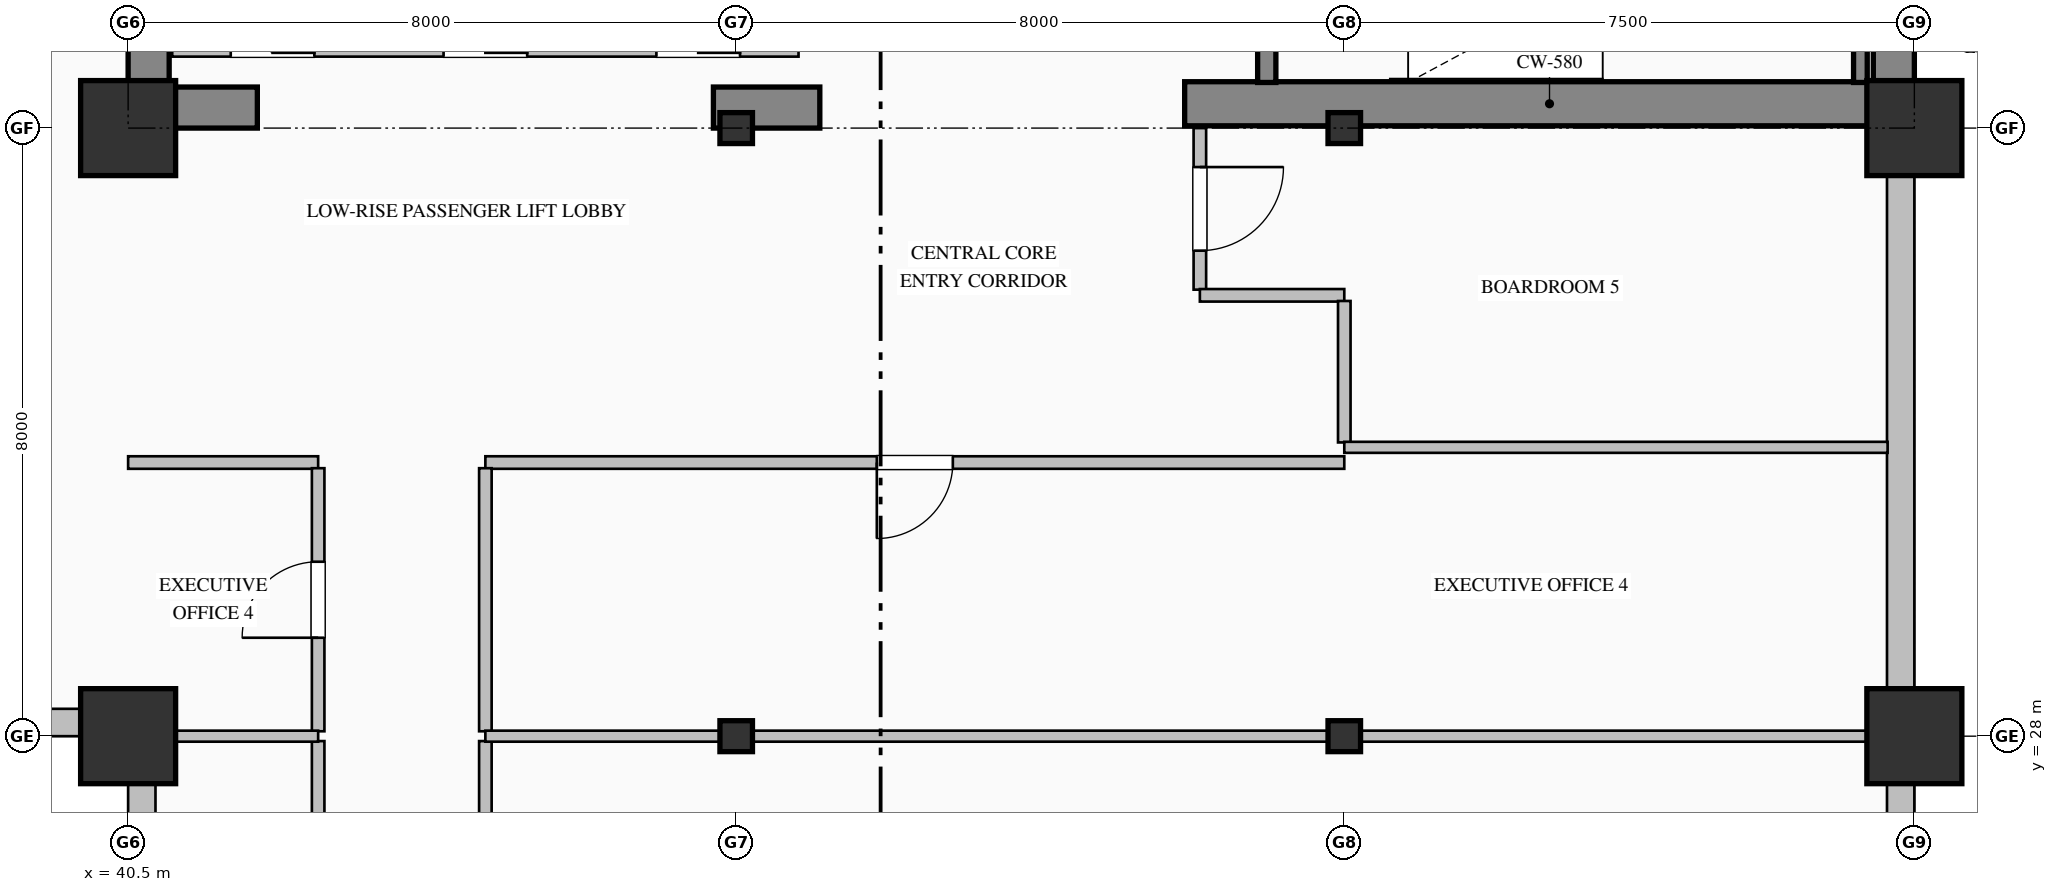
"""IFC4 building model, lengths in metres.
Left out: names, types, materials, properties, quantities, classifications, styles, units other than length and angle.
Written with IfcOpenShell. Run it as: python <this file> out.ifc"""

import sys

from ifc_helpers import new_model, si_unit, direction, frame, frame_2d, origin, origin_2d, place, context, subcontext, project, spatial, rectangle, hollow_rectangle, i_section, extrude, element, fill, save


model = new_model("IFC4")
c1 = context("Model", 3, precision=1e-05, world=origin(), true_north=direction((0.0, 1.0)))
c2 = subcontext(c1, "Body", "Model", "MODEL_VIEW")
j1 = project(units=[si_unit("LENGTHUNIT", "METRE"), si_unit("PLANEANGLEUNIT", "RADIAN")], contexts=[c1])
p1 = place(None, origin())
s1 = spatial("IfcSite", under=j1, at=p1, CompositionType="ELEMENT")
p2 = place(p1, origin())
s2 = spatial("IfcBuilding", under=s1, at=p2, CompositionType="ELEMENT")
p3 = place(p2, frame((0.0, 0.0, 36.2)))
s3 = spatial("IfcBuildingStorey", under=s2, at=p3, CompositionType="ELEMENT", Elevation=36.2)
p4 = place(p3, frame((63.73, 36.32, 0.0), z_axis=(0.0, 0.0, 1.0), x_axis=(0.0, 1.0, 0.0)))
e1 = element("IfcWall", 1, at=p4, inside=s3, PredefinedType="SHEAR", context=c2, shape_type="SweptSolid", body=[
    extrude(rectangle(XDim=15.14, YDim=0.54, at=frame_2d((7.57, 0.0))), origin(), (0.0, 0.0, 1.0), 3.75),
])
p5 = place(p3, frame((40.77, 36.54, 0.0), z_axis=(0.0, 0.0, 1.0), x_axis=(0.0, 1.0, 0.0)))
e2 = element("IfcWall", 2, at=p5, inside=s3, PredefinedType="SHEAR", context=c2, shape_type="SweptSolid", body=[
    extrude(rectangle(XDim=7.86, YDim=0.54, at=frame_2d((3.93, 0.0))), origin(), (0.0, 0.0, 1.0), 3.75),
])
p6 = place(p3, frame((40.5, 36.27, 0.0), z_axis=(0.0, 0.0, 1.0), x_axis=(1.0, 0.0, 0.0)))
e3 = element("IfcWall", 3, at=p6, inside=s3, PredefinedType="SHEAR", context=c2, shape_type="SweptSolid", body=[
    extrude(rectangle(XDim=1.7, YDim=0.54, at=frame_2d((0.85, 0.0))), origin(), (0.0, 0.0, 1.0), 3.75),
])
p7 = place(p3, frame((48.2, 36.27, 0.0), z_axis=(0.0, 0.0, 1.0), x_axis=(1.0, 0.0, 0.0)))
e4 = element("IfcWall", 4, at=p7, inside=s3, PredefinedType="SHEAR", context=c2, shape_type="SweptSolid", body=[
    extrude(rectangle(XDim=1.4, YDim=0.54, at=frame_2d((0.7, 0.0))), origin(), (0.0, 0.0, 1.0), 3.75),
])
p8 = place(p3, frame((54.4, 36.32, 0.0), z_axis=(0.0, 0.0, 1.0), x_axis=(1.0, 0.0, 0.0)))
e5 = element("IfcWall", 5, at=p8, inside=s3, PredefinedType="SHEAR", context=c2, shape_type="SweptSolid", body=[
    extrude(rectangle(XDim=9.6, YDim=0.58, at=frame_2d((4.8, 0.0))), origin(), (0.0, 0.0, 1.0), 4.0),
])
for number, where, z_axis, x_axis in (
    (6, (40.5, 28.0, 0.0), (0.0, 0.0, 1.0), (1.0, 0.0, 0.0)),
    (7, (40.5, 36.0, 0.0), (0.0, 0.0, 1.0), (1.0, 0.0, 0.0)),
):
    element("IfcColumn", number, at=place(p3, frame(where, z_axis=z_axis, x_axis=x_axis)), inside=s3, PredefinedType="COLUMN", context=c2, shape_type="SweptSolid", body=[
        extrude(hollow_rectangle(XDim=1.25, YDim=1.25, WallThickness=0.045, at=origin_2d()), origin(), (0.0, 0.0, 1.0), 4.0),
    ])
for number, where, z_axis, x_axis in (
    (8, (48.5, 28.0, 0.0), (0.0, 0.0, 1.0), (1.0, 0.0, 0.0)),
    (9, (48.5, 36.0, 0.0), (0.0, 0.0, 1.0), (1.0, 0.0, 0.0)),
    (10, (56.5, 28.0, 0.0), (0.0, 0.0, 1.0), (1.0, 0.0, 0.0)),
    (11, (56.5, 36.0, 0.0), (0.0, 0.0, 1.0), (1.0, 0.0, 0.0)),
):
    element("IfcColumn", number, at=place(p3, frame(where, z_axis=z_axis, x_axis=x_axis)), inside=s3, PredefinedType="COLUMN", context=c2, shape_type="SweptSolid", body=[
        extrude(i_section(OverallWidth=0.407, OverallDepth=0.428, WebThickness=0.02, FlangeThickness=0.035, FilletRadius=0.022, at=origin_2d()), origin(), (0.0, 0.0, 1.0), 4.0),
    ])
for number, where, z_axis, x_axis in (
    (12, (64.0, 28.0, 0.0), (0.0, 0.0, 1.0), (1.0, 0.0, 0.0)),
    (13, (64.0, 36.0, 0.0), (0.0, 0.0, 1.0), (1.0, 0.0, 0.0)),
):
    element("IfcColumn", number, at=place(p3, frame(where, z_axis=z_axis, x_axis=x_axis)), inside=s3, PredefinedType="COLUMN", context=c2, shape_type="SweptSolid", body=[
        extrude(hollow_rectangle(XDim=1.25, YDim=1.25, WallThickness=0.045, at=origin_2d()), origin(), (0.0, 0.0, 1.0), 4.0),
    ])
p9 = place(p3, frame((40.68, 8.0, 0.0), z_axis=(0.0, 0.0, 1.0), x_axis=(0.0, 1.0, 0.0)))
e14 = element("IfcWall", 14, at=p9, inside=s3, PredefinedType="SOLIDWALL", context=c2, shape_type="SweptSolid", body=[
    extrude(rectangle(XDim=20.36, YDim=0.36, at=frame_2d((10.18, 0.0))), origin(), (0.0, 0.0, 1.0), 3.05),
])
p10 = place(p9, frame((6.6, 0.0, 0.7)))
e15 = element("IfcOpeningElement", 15, at=p10, cuts=e14, PredefinedType="OPENING", context=c2, shape_type="SweptSolid", body=[
    extrude(rectangle(XDim=1.2, YDim=1.85, at=frame_2d((0.6, 0.925))), frame((0.0, 0.19, 0.0), z_axis=(0.0, -1.0, 0.0), x_axis=(1.0, 0.0, 0.0)), (0.0, 0.0, 1.0), 0.38),
])
p11 = place(p9, frame((13.8, 0.0, 0.7)))
e16 = element("IfcOpeningElement", 16, at=p11, cuts=e14, PredefinedType="OPENING", context=c2, shape_type="SweptSolid", body=[
    extrude(rectangle(XDim=1.2, YDim=1.85, at=frame_2d((0.6, 0.925))), frame((0.0, 0.19, 0.0), z_axis=(0.0, -1.0, 0.0), x_axis=(1.0, 0.0, 0.0)), (0.0, 0.0, 1.0), 0.38),
])
p12 = place(p3, frame((40.52, 28.18, 0.0), z_axis=(0.0, 0.0, 1.0), x_axis=(-1.0, 0.0, 0.0)))
e17 = element("IfcWall", 17, at=p12, inside=s3, PredefinedType="SOLIDWALL", context=c2, shape_type="SweptSolid", body=[
    extrude(rectangle(XDim=36.52, YDim=0.36, at=frame_2d((18.26, 0.0))), origin(), (0.0, 0.0, 1.0), 3.05),
])
p13 = place(p12, frame((10.2, 0.0, 0.7)))
e18 = element("IfcOpeningElement", 18, at=p13, cuts=e17, PredefinedType="OPENING", context=c2, shape_type="SweptSolid", body=[
    extrude(rectangle(XDim=1.2, YDim=1.85, at=frame_2d((0.6, 0.925))), frame((0.0, 0.19, 0.0), z_axis=(0.0, -1.0, 0.0), x_axis=(1.0, 0.0, 0.0)), (0.0, 0.0, 1.0), 0.38),
])
p14 = place(p12, frame((13.8, 0.0, 0.7)))
e19 = element("IfcOpeningElement", 19, at=p14, cuts=e17, PredefinedType="OPENING", context=c2, shape_type="SweptSolid", body=[
    extrude(rectangle(XDim=1.2, YDim=1.85, at=frame_2d((0.6, 0.925))), frame((0.0, 0.19, 0.0), z_axis=(0.0, -1.0, 0.0), x_axis=(1.0, 0.0, 0.0)), (0.0, 0.0, 1.0), 0.38),
])
p15 = place(p12, frame((17.4, 0.0, 0.7)))
e20 = element("IfcOpeningElement", 20, at=p15, cuts=e17, PredefinedType="OPENING", context=c2, shape_type="SweptSolid", body=[
    extrude(rectangle(XDim=1.2, YDim=1.85, at=frame_2d((0.6, 0.925))), frame((0.0, 0.19, 0.0), z_axis=(0.0, -1.0, 0.0), x_axis=(1.0, 0.0, 0.0)), (0.0, 0.0, 1.0), 0.38),
])
p16 = place(p12, frame((21.0, 0.0, 0.7)))
e21 = element("IfcOpeningElement", 21, at=p16, cuts=e17, PredefinedType="OPENING", context=c2, shape_type="SweptSolid", body=[
    extrude(rectangle(XDim=1.2, YDim=1.85, at=frame_2d((0.6, 0.925))), frame((0.0, 0.19, 0.0), z_axis=(0.0, -1.0, 0.0), x_axis=(1.0, 0.0, 0.0)), (0.0, 0.0, 1.0), 0.38),
])
p17 = place(p12, frame((28.2, 0.0, 0.7)))
e22 = element("IfcOpeningElement", 22, at=p17, cuts=e17, PredefinedType="OPENING", context=c2, shape_type="SweptSolid", body=[
    extrude(rectangle(XDim=1.2, YDim=1.85, at=frame_2d((0.6, 0.925))), frame((0.0, 0.19, 0.0), z_axis=(0.0, -1.0, 0.0), x_axis=(1.0, 0.0, 0.0)), (0.0, 0.0, 1.0), 0.38),
])
p18 = place(p3, frame((63.82, 36.05, 0.0), z_axis=(0.0, 0.0, 1.0), x_axis=(0.0, -1.0, 0.0)))
e23 = element("IfcWall", 23, at=p18, inside=s3, PredefinedType="SOLIDWALL", context=c2, shape_type="SweptSolid", body=[
    extrude(rectangle(XDim=28.05, YDim=0.36, at=frame_2d((14.025, 0.0))), origin(), (0.0, 0.0, 1.0), 3.25),
])
p19 = place(p18, frame((9.75, 0.0, 0.85)))
e24 = element("IfcOpeningElement", 24, at=p19, cuts=e23, PredefinedType="OPENING", context=c2, shape_type="SweptSolid", body=[
    extrude(rectangle(XDim=2.1, YDim=2.05, at=frame_2d((1.05, 1.025))), frame((0.0, 0.19, 0.0), z_axis=(0.0, -1.0, 0.0), x_axis=(1.0, 0.0, 0.0)), (0.0, 0.0, 1.0), 0.38),
])
p20 = place(p18, frame((13.2, 0.0, 0.8)))
e25 = element("IfcOpeningElement", 25, at=p20, cuts=e23, PredefinedType="OPENING", context=c2, shape_type="SweptSolid", body=[
    extrude(rectangle(XDim=2.4, YDim=2.15, at=frame_2d((1.2, 1.075))), frame((0.0, 0.19, 0.0), z_axis=(0.0, -1.0, 0.0), x_axis=(1.0, 0.0, 0.0)), (0.0, 0.0, 1.0), 0.38),
])
p21 = place(p3, frame((55.48, 39.75, 0.0), z_axis=(0.0, 0.0, 1.0), x_axis=(0.0, -1.0, 0.0)))
e26 = element("IfcWall", 26, at=p21, inside=s3, PredefinedType="SOLIDWALL", context=c2, shape_type="SweptSolid", body=[
    extrude(rectangle(XDim=3.15, YDim=0.24, at=frame_2d((1.575, 0.0))), origin(), (0.0, 0.0, 1.0), 4.0),
])
p22 = place(p21, frame((1.0, 0.0, 0.0)))
e27 = element("IfcOpeningElement", 27, at=p22, cuts=e26, PredefinedType="OPENING", context=c2, shape_type="SweptSolid", body=[
    extrude(rectangle(XDim=1.15, YDim=2.2, at=frame_2d((0.575, 1.1))), frame((0.0, 0.13, 0.0), z_axis=(0.0, -1.0, 0.0), x_axis=(1.0, 0.0, 0.0)), (0.0, 0.0, 1.0), 0.26),
])
p23 = place(p3, frame((63.29, 36.6, 0.0), z_axis=(0.0, 0.0, 1.0), x_axis=(0.0, 1.0, 0.0)))
e28 = element("IfcWall", 28, at=p23, inside=s3, PredefinedType="SOLIDWALL", context=c2, shape_type="SweptSolid", body=[
    extrude(rectangle(XDim=3.15, YDim=0.18, at=frame_2d((1.575, 0.0))), origin(), (0.0, 0.0, 1.0), 4.0),
])
p24 = place(p3, frame((49.32, 37.05, 0.0), z_axis=(0.0, 0.0, 1.0), x_axis=(-1.0, 0.0, 0.0)))
e29 = element("IfcWall", 29, at=p24, inside=s3, PredefinedType="PARTITIONING", context=c2, shape_type="SweptSolid", body=[
    extrude(rectangle(XDim=8.24, YDim=0.22, at=frame_2d((4.12, 0.0))), origin(), (0.0, 0.0, 1.0), 3.75),
])
p25 = place(p24, frame((6.37, 0.0, 0.0)))
e30 = element("IfcOpeningElement", 30, at=p25, cuts=e29, PredefinedType="OPENING", context=c2, shape_type="SweptSolid", body=[
    extrude(rectangle(XDim=1.1, YDim=2.2, at=frame_2d((0.55, 1.1))), frame((0.0, 0.12, 0.0), z_axis=(0.0, -1.0, 0.0), x_axis=(1.0, 0.0, 0.0)), (0.0, 0.0, 1.0), 0.24),
])
p26 = place(p24, frame((3.57, 0.0, 0.0)))
e31 = element("IfcOpeningElement", 31, at=p26, cuts=e29, PredefinedType="OPENING", context=c2, shape_type="SweptSolid", body=[
    extrude(rectangle(XDim=1.1, YDim=2.2, at=frame_2d((0.55, 1.1))), frame((0.0, 0.12, 0.0), z_axis=(0.0, -1.0, 0.0), x_axis=(1.0, 0.0, 0.0)), (0.0, 0.0, 1.0), 0.24),
])
p27 = place(p24, frame((0.77, 0.0, 0.0)))
e32 = element("IfcOpeningElement", 32, at=p27, cuts=e29, PredefinedType="OPENING", context=c2, shape_type="SweptSolid", body=[
    extrude(rectangle(XDim=1.1, YDim=2.2, at=frame_2d((0.55, 1.1))), frame((0.0, 0.12, 0.0), z_axis=(0.0, -1.0, 0.0), x_axis=(1.0, 0.0, 0.0)), (0.0, 0.0, 1.0), 0.24),
])
p28 = place(p3, frame((56.5, 31.6, 0.0), z_axis=(0.0, 0.0, 1.0), x_axis=(-1.0, 0.0, 0.0)))
e33 = element("IfcWall", 33, at=p28, inside=s3, PredefinedType="PARTITIONING", context=c2, shape_type="SweptSolid", body=[
    extrude(rectangle(XDim=11.3, YDim=0.165, at=frame_2d((5.65, 0.0))), origin(), (0.0, 0.0, 1.0), 3.75),
])
p29 = place(p28, frame((5.15, 0.0, 0.0)))
e34 = element("IfcOpeningElement", 34, at=p29, cuts=e33, PredefinedType="OPENING", context=c2, shape_type="SweptSolid", body=[
    extrude(rectangle(XDim=1.0, YDim=2.15, at=frame_2d((0.5, 1.075))), frame((0.0, 0.093, 0.0), z_axis=(0.0, -1.0, 0.0), x_axis=(1.0, 0.0, 0.0)), (0.0, 0.0, 1.0), 0.185),
])
p30 = place(p3, frame((54.6, 36.0, 0.0), z_axis=(0.0, 0.0, 1.0), x_axis=(0.0, -1.0, 0.0)))
e35 = element("IfcWall", 35, at=p30, inside=s3, PredefinedType="PARTITIONING", context=c2, shape_type="SweptSolid", body=[
    extrude(rectangle(XDim=2.125, YDim=0.165, at=frame_2d((1.063, 0.0))), origin(), (0.0, 0.0, 1.0), 3.75),
])
p31 = place(p30, frame((0.513, 0.0, 0.0)))
e36 = element("IfcOpeningElement", 36, at=p31, cuts=e35, PredefinedType="OPENING", context=c2, shape_type="SweptSolid", body=[
    extrude(rectangle(XDim=1.1, YDim=2.2, at=frame_2d((0.55, 1.1))), frame((0.0, 0.093, 0.0), z_axis=(0.0, -1.0, 0.0), x_axis=(1.0, 0.0, 0.0)), (0.0, 0.0, 1.0), 0.185),
])
p32 = place(p3, frame((54.6, 33.8, 0.0), z_axis=(0.0, 0.0, 1.0), x_axis=(1.0, 0.0, 0.0)))
e37 = element("IfcWall", 37, at=p32, inside=s3, PredefinedType="PARTITIONING", context=c2, shape_type="SweptSolid", body=[
    extrude(rectangle(XDim=1.9, YDim=0.165, at=frame_2d((0.95, 0.0))), origin(), (0.0, 0.0, 1.0), 3.75),
])
p33 = place(p3, frame((56.5, 33.726, 0.0), z_axis=(0.0, 0.0, 1.0), x_axis=(0.0, -1.0, 0.0)))
e38 = element("IfcWall", 38, at=p33, inside=s3, PredefinedType="PARTITIONING", context=c2, shape_type="SweptSolid", body=[
    extrude(rectangle(XDim=1.861, YDim=0.165, at=frame_2d((0.931, 0.0))), origin(), (0.0, 0.0, 1.0), 3.042),
])
p34 = place(p3, frame((43.0, 31.6, 0.0), z_axis=(0.0, 0.0, 1.0), x_axis=(-1.0, 0.0, 0.0)))
e39 = element("IfcWall", 39, at=p34, inside=s3, PredefinedType="PARTITIONING", context=c2, shape_type="SweptSolid", body=[
    extrude(rectangle(XDim=2.5, YDim=0.165, at=frame_2d((1.25, 0.0))), origin(), (0.0, 0.0, 1.0), 3.75),
])
p35 = place(p3, frame((45.2, 27.936, 0.0), z_axis=(0.0, 0.0, 1.0), x_axis=(0.0, -1.0, 0.0)))
e40 = element("IfcWall", 40, at=p35, inside=s3, PredefinedType="PARTITIONING", context=c2, shape_type="SweptSolid", body=[
    extrude(rectangle(XDim=4.671, YDim=0.165, at=frame_2d((2.335, 0.0))), origin(), (0.0, 0.0, 1.0), 3.75),
])
p36 = place(p35, frame((1.835, 0.0, 0.0)))
e41 = element("IfcOpeningElement", 41, at=p36, cuts=e40, PredefinedType="OPENING", context=c2, shape_type="SweptSolid", body=[
    extrude(rectangle(XDim=1.0, YDim=2.15, at=frame_2d((0.5, 1.075))), frame((0.0, 0.093, 0.0), z_axis=(0.0, -1.0, 0.0), x_axis=(1.0, 0.0, 0.0)), (0.0, 0.0, 1.0), 0.185),
])
p37 = place(p3, frame((45.2, 31.525, 0.0), z_axis=(0.0, 0.0, 1.0), x_axis=(0.0, -1.0, 0.0)))
e42 = element("IfcWall", 42, at=p37, inside=s3, PredefinedType="PARTITIONING", context=c2, shape_type="SweptSolid", body=[
    extrude(rectangle(XDim=3.461, YDim=0.165, at=frame_2d((1.73, 0.0))), origin(), (0.0, 0.0, 1.0), 3.75),
])
p38 = place(p3, frame((43.0, 24.557, 0.0), z_axis=(0.0, 0.0, 1.0), x_axis=(0.0, 1.0, 0.0)))
e43 = element("IfcWall", 43, at=p38, inside=s3, PredefinedType="PARTITIONING", context=c2, shape_type="SweptSolid", body=[
    extrude(rectangle(XDim=3.379, YDim=0.165, at=frame_2d((1.689, 0.0))), origin(), (0.0, 0.0, 1.0), 3.75),
])
p39 = place(p38, frame((1.189, 0.0, 0.0)))
e44 = element("IfcOpeningElement", 44, at=p39, cuts=e43, PredefinedType="OPENING", context=c2, shape_type="SweptSolid", body=[
    extrude(rectangle(XDim=1.0, YDim=2.15, at=frame_2d((0.5, 1.075))), frame((0.0, 0.093, 0.0), z_axis=(0.0, -1.0, 0.0), x_axis=(1.0, 0.0, 0.0)), (0.0, 0.0, 1.0), 0.185),
])
p40 = place(p3, frame((43.0, 28.064, 0.0), z_axis=(0.0, 0.0, 1.0), x_axis=(0.0, 1.0, 0.0)))
e45 = element("IfcWall", 45, at=p40, inside=s3, PredefinedType="PARTITIONING", context=c2, shape_type="SweptSolid", body=[
    extrude(rectangle(XDim=3.461, YDim=0.165, at=frame_2d((1.73, 0.0))), origin(), (0.0, 0.0, 1.0), 3.75),
])
p41 = place(p40, frame((1.23, 0.0, 0.0)))
e46 = element("IfcOpeningElement", 46, at=p41, cuts=e45, PredefinedType="OPENING", context=c2, shape_type="SweptSolid", body=[
    extrude(rectangle(XDim=1.0, YDim=2.15, at=frame_2d((0.5, 1.075))), frame((0.0, 0.093, 0.0), z_axis=(0.0, -1.0, 0.0), x_axis=(1.0, 0.0, 0.0)), (0.0, 0.0, 1.0), 0.185),
])
p42 = place(p3, frame((45.2, 28.0, 0.0), z_axis=(0.0, 0.0, 1.0), x_axis=(1.0, 0.0, 0.0)))
e47 = element("IfcWall", 47, at=p42, inside=s3, PredefinedType="PARTITIONING", context=c2, shape_type="SweptSolid", body=[
    extrude(rectangle(XDim=18.448, YDim=0.145, at=frame_2d((9.224, 0.0))), origin(), (0.0, 0.0, 1.0), 3.042),
])
p43 = place(p3, frame((56.5, 31.8, 0.0), z_axis=(0.0, 0.0, 1.0), x_axis=(1.0, 0.0, 0.0)))
e48 = element("IfcWall", 48, at=p43, inside=s3, PredefinedType="PARTITIONING", context=c2, shape_type="SweptSolid", body=[
    extrude(rectangle(XDim=7.148, YDim=0.145, at=frame_2d((3.574, 0.0))), origin(), (0.0, 0.0, 1.0), 3.75),
])
p44 = place(p3, frame((40.852, 28.0, 0.0), z_axis=(0.0, 0.0, 1.0), x_axis=(1.0, 0.0, 0.0)))
e49 = element("IfcWall", 49, at=p44, inside=s3, PredefinedType="PARTITIONING", context=c2, shape_type="SweptSolid", body=[
    extrude(rectangle(XDim=2.148, YDim=0.145, at=frame_2d((1.074, 0.0))), origin(), (0.0, 0.0, 1.0), 3.042),
])
p45 = place(p29, origin())
e50 = element("IfcDoor", 50, at=p45, inside=s3, OperationType="SINGLE_SWING_RIGHT", PredefinedType="DOOR", context=c2, shape_type="SweptSolid", body=[
    extrude(rectangle(XDim=1.0, YDim=2.15, at=frame_2d((0.5, 1.075))), frame((0.0, 0.025, 0.0), z_axis=(0.0, -1.0, 0.0), x_axis=(1.0, 0.0, 0.0)), (0.0, 0.0, 1.0), 0.05),
])
fill(e34, e50)
p46 = place(p31, origin())
e51 = element("IfcDoor", 51, at=p46, inside=s3, OperationType="SINGLE_SWING_LEFT", PredefinedType="DOOR", context=c2, shape_type="SweptSolid", body=[
    extrude(rectangle(XDim=1.1, YDim=2.2, at=frame_2d((0.55, 1.1))), frame((0.0, 0.025, 0.0), z_axis=(0.0, -1.0, 0.0), x_axis=(1.0, 0.0, 0.0)), (0.0, 0.0, 1.0), 0.05),
])
fill(e36, e51)
p47 = place(p41, origin())
e52 = element("IfcDoor", 52, at=p47, inside=s3, OperationType="SINGLE_SWING_LEFT", PredefinedType="DOOR", context=c2, shape_type="SweptSolid", body=[
    extrude(rectangle(XDim=1.0, YDim=2.15, at=frame_2d((0.5, 1.075))), frame((0.0, 0.025, 0.0), z_axis=(0.0, -1.0, 0.0), x_axis=(1.0, 0.0, 0.0)), (0.0, 0.0, 1.0), 0.05),
])
fill(e46, e52)
save(model, sys.argv[1])
